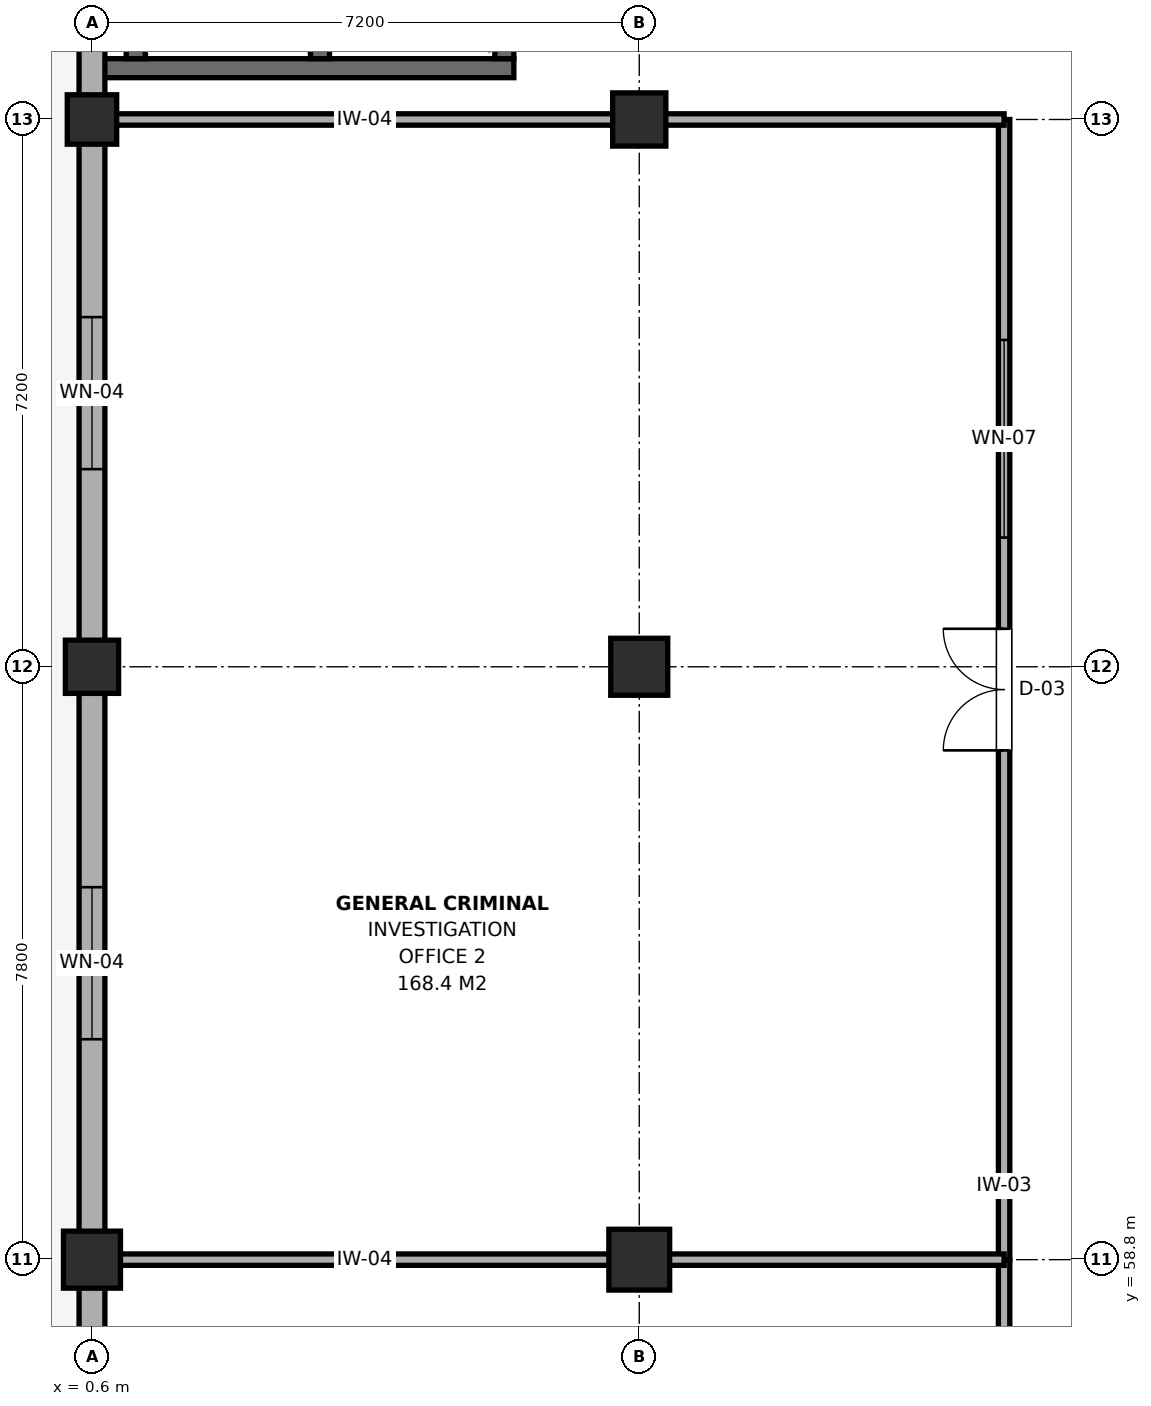
"""IFC4 building model, lengths in metres.
Left out: names, types, materials, properties, quantities, classifications, styles, units other than length and angle.
Written with IfcOpenShell. Run it as: python <this file> out.ifc"""

import sys

from ifc_helpers import new_model, si_unit, direction, frame, frame_2d, origin, origin_2d, place, context, subcontext, project, spatial, rectangle, extrude, element, fill, save


model = new_model("IFC4")
c1 = context("Model", 3, precision=1e-05, world=origin(), true_north=direction((0.0, 1.0)))
c2 = subcontext(c1, "Body", "Model", "MODEL_VIEW")
j1 = project(units=[si_unit("LENGTHUNIT", "METRE"), si_unit("PLANEANGLEUNIT", "RADIAN")], contexts=[c1])
p1 = place(None, origin())
s1 = spatial("IfcSite", under=j1, at=p1, CompositionType="ELEMENT")
p2 = place(p1, origin())
s2 = spatial("IfcBuilding", under=s1, at=p2, CompositionType="ELEMENT")
p3 = place(p2, frame((0.0, 0.0, 4.8)))
s3 = spatial("IfcBuildingStorey", under=s2, at=p3, CompositionType="ELEMENT", Elevation=4.8)
p4 = place(p3, frame((0.6, 58.8, 0.0), z_axis=(0.0, 0.0, 1.0), x_axis=(1.0, 0.0, 0.0)))
e1 = element("IfcColumn", 1, at=p4, inside=s3, PredefinedType="COLUMN", context=c2, shape_type="SweptSolid", body=[
    extrude(rectangle(XDim=0.75, YDim=0.75, at=origin_2d()), origin(), (0.0, 0.0, 1.0), 4.2),
])
p5 = place(p3, frame((0.6, 66.6, 0.0), z_axis=(0.0, 0.0, 1.0), x_axis=(1.0, 0.0, 0.0)))
e2 = element("IfcColumn", 2, at=p5, inside=s3, PredefinedType="COLUMN", context=c2, shape_type="SweptSolid", body=[
    extrude(rectangle(XDim=0.7, YDim=0.7, at=origin_2d()), origin(), (0.0, 0.0, 1.0), 4.2),
])
p6 = place(p3, frame((0.6, 73.8, 0.0), z_axis=(0.0, 0.0, 1.0), x_axis=(1.0, 0.0, 0.0)))
e3 = element("IfcColumn", 3, at=p6, inside=s3, PredefinedType="COLUMN", context=c2, shape_type="SweptSolid", body=[
    extrude(rectangle(XDim=0.65, YDim=0.65, at=origin_2d()), origin(), (0.0, 0.0, 1.0), 4.2),
])
p7 = place(p3, frame((7.8, 58.8, 0.0), z_axis=(0.0, 0.0, 1.0), x_axis=(1.0, 0.0, 0.0)))
e4 = element("IfcColumn", 4, at=p7, inside=s3, PredefinedType="COLUMN", context=c2, shape_type="SweptSolid", body=[
    extrude(rectangle(XDim=0.8, YDim=0.8, at=origin_2d()), origin(), (0.0, 0.0, 1.0), 4.2),
])
p8 = place(p3, frame((7.8, 66.6, 0.0), z_axis=(0.0, 0.0, 1.0), x_axis=(1.0, 0.0, 0.0)))
e5 = element("IfcColumn", 5, at=p8, inside=s3, PredefinedType="COLUMN", context=c2, shape_type="SweptSolid", body=[
    extrude(rectangle(XDim=0.75, YDim=0.75, at=origin_2d()), origin(), (0.0, 0.0, 1.0), 4.2),
])
p9 = place(p3, frame((7.8, 73.8, 0.0), z_axis=(0.0, 0.0, 1.0), x_axis=(1.0, 0.0, 0.0)))
e6 = element("IfcColumn", 6, at=p9, inside=s3, PredefinedType="COLUMN", context=c2, shape_type="SweptSolid", body=[
    extrude(rectangle(XDim=0.7, YDim=0.7, at=origin_2d()), origin(), (0.0, 0.0, 1.0), 4.2),
])
p10 = place(p3, frame((0.75, 74.475, 0.0), z_axis=(0.0, 0.0, 1.0), x_axis=(1.0, 0.0, 0.0)))
e7 = element("IfcWall", 7, at=p10, inside=s3, PredefinedType="SHEAR", context=c2, shape_type="SweptSolid", body=[
    extrude(rectangle(XDim=5.4, YDim=0.25, at=frame_2d((2.7, 0.0))), origin(), (0.0, 0.0, 1.0), 3.98),
])
for number, where, z_axis, x_axis in (
    (8, (1.175, 74.6, 0.0), (0.0, 0.0, 1.0), (0.0, 1.0, 0.0)),
    (9, (3.6, 74.6, 0.0), (0.0, 0.0, 1.0), (0.0, 1.0, 0.0)),
):
    element("IfcWall", number, at=place(p3, frame(where, z_axis=z_axis, x_axis=x_axis)), inside=s3, PredefinedType="SHEAR", context=c2, shape_type="SweptSolid", body=[
        extrude(rectangle(XDim=3.0, YDim=0.25, at=frame_2d((1.5, 0.0))), origin(), (0.0, 0.0, 1.0), 3.98),
    ])
p11 = place(p3, frame((6.025, 74.6, 0.0), z_axis=(0.0, 0.0, 1.0), x_axis=(0.0, 1.0, 0.0)))
e10 = element("IfcWall", 10, at=p11, inside=s3, PredefinedType="SHEAR", context=c2, shape_type="SweptSolid", body=[
    extrude(rectangle(XDim=2.4, YDim=0.25, at=frame_2d((1.2, 0.0))), origin(), (0.0, 0.0, 1.0), 3.98),
])
p12 = place(p11, frame((0.7, 0.0, 0.0)))
e11 = element("IfcOpeningElement", 11, at=p12, cuts=e10, PredefinedType="OPENING", context=c2, shape_type="SweptSolid", body=[
    extrude(rectangle(XDim=1.0, YDim=2.15, at=frame_2d((0.5, 1.075))), frame((0.0, 0.14, 0.0), z_axis=(0.0, -1.0, 0.0), x_axis=(1.0, 0.0, 0.0)), (0.0, 0.0, 1.0), 0.28),
])
p13 = place(p3, frame((0.6, 53.2, 0.0), z_axis=(0.0, 0.0, 1.0), x_axis=(0.0, 1.0, 0.0)))
e12 = element("IfcWall", 12, at=p13, inside=s3, PredefinedType="SOLIDWALL", context=c2, shape_type="SweptSolid", body=[
    extrude(rectangle(XDim=5.6, YDim=0.34, at=frame_2d((2.8, 0.0))), origin(), (0.0, 0.0, 1.0), 3.375),
])
p14 = place(p13, frame((1.8, 0.0, 0.9)))
e13 = element("IfcOpeningElement", 13, at=p14, cuts=e12, PredefinedType="OPENING", context=c2, shape_type="SweptSolid", body=[
    extrude(rectangle(XDim=2.0, YDim=1.8, at=frame_2d((1.0, 0.9))), frame((0.0, 0.185, 0.0), z_axis=(0.0, -1.0, 0.0), x_axis=(1.0, 0.0, 0.0)), (0.0, 0.0, 1.0), 0.37),
])
p15 = place(p3, frame((0.6, 58.8, 0.0), z_axis=(0.0, 0.0, 1.0), x_axis=(0.0, 1.0, 0.0)))
e14 = element("IfcWall", 14, at=p15, inside=s3, PredefinedType="SOLIDWALL", context=c2, shape_type="SweptSolid", body=[
    extrude(rectangle(XDim=7.8, YDim=0.34, at=frame_2d((3.9, 0.0))), origin(), (0.0, 0.0, 1.0), 3.425),
])
p16 = place(p15, frame((2.9, 0.0, 0.9)))
e15 = element("IfcOpeningElement", 15, at=p16, cuts=e14, PredefinedType="OPENING", context=c2, shape_type="SweptSolid", body=[
    extrude(rectangle(XDim=2.0, YDim=1.8, at=frame_2d((1.0, 0.9))), frame((0.0, 0.185, 0.0), z_axis=(0.0, -1.0, 0.0), x_axis=(1.0, 0.0, 0.0)), (0.0, 0.0, 1.0), 0.37),
])
p17 = place(p3, frame((0.6, 66.6, 0.0), z_axis=(0.0, 0.0, 1.0), x_axis=(0.0, 1.0, 0.0)))
e16 = element("IfcWall", 16, at=p17, inside=s3, PredefinedType="SOLIDWALL", context=c2, shape_type="SweptSolid", body=[
    extrude(rectangle(XDim=7.2, YDim=0.34, at=frame_2d((3.6, 0.0))), origin(), (0.0, 0.0, 1.0), 3.475),
])
p18 = place(p17, frame((2.6, 0.0, 0.9)))
e17 = element("IfcOpeningElement", 17, at=p18, cuts=e16, PredefinedType="OPENING", context=c2, shape_type="SweptSolid", body=[
    extrude(rectangle(XDim=2.0, YDim=1.8, at=frame_2d((1.0, 0.9))), frame((0.0, 0.185, 0.0), z_axis=(0.0, -1.0, 0.0), x_axis=(1.0, 0.0, 0.0)), (0.0, 0.0, 1.0), 0.37),
])
p19 = place(p3, frame((0.6, 73.8, 0.0), z_axis=(0.0, 0.0, 1.0), x_axis=(0.0, 1.0, 0.0)))
e18 = element("IfcWall", 18, at=p19, inside=s3, PredefinedType="SOLIDWALL", context=c2, shape_type="SweptSolid", body=[
    extrude(rectangle(XDim=7.2, YDim=0.34, at=frame_2d((3.6, 0.0))), origin(), (0.0, 0.0, 1.0), 3.525),
])
p20 = place(p3, frame((12.6, 40.0, 0.0), z_axis=(0.0, 0.0, 1.0), x_axis=(0.0, 1.0, 0.0)))
e19 = element("IfcWall", 19, at=p20, inside=s3, PredefinedType="PARTITIONING", context=c2, shape_type="SweptSolid", body=[
    extrude(rectangle(XDim=18.8, YDim=0.15, at=frame_2d((9.4, 0.0))), origin(), (0.0, 0.0, 1.0), 3.425),
])
p21 = place(p20, frame((8.6, 0.0, 0.0)))
e20 = element("IfcOpeningElement", 20, at=p21, cuts=e19, PredefinedType="OPENING", context=c2, shape_type="SweptSolid", body=[
    extrude(rectangle(XDim=1.6, YDim=2.15, at=frame_2d((0.8, 1.075))), frame((0.0, 0.09, 0.0), z_axis=(0.0, -1.0, 0.0), x_axis=(1.0, 0.0, 0.0)), (0.0, 0.0, 1.0), 0.18),
])
p22 = place(p20, frame((3.4, 0.0, 0.95)))
e21 = element("IfcOpeningElement", 21, at=p22, cuts=e19, PredefinedType="OPENING", context=c2, shape_type="SweptSolid", body=[
    extrude(rectangle(XDim=2.6, YDim=1.5, at=frame_2d((1.3, 0.75))), frame((0.0, 0.09, 0.0), z_axis=(0.0, -1.0, 0.0), x_axis=(1.0, 0.0, 0.0)), (0.0, 0.0, 1.0), 0.18),
])
p23 = place(p20, frame((12.8, 0.0, 0.95)))
e22 = element("IfcOpeningElement", 22, at=p23, cuts=e19, PredefinedType="OPENING", context=c2, shape_type="SweptSolid", body=[
    extrude(rectangle(XDim=2.6, YDim=1.5, at=frame_2d((1.3, 0.75))), frame((0.0, 0.09, 0.0), z_axis=(0.0, -1.0, 0.0), x_axis=(1.0, 0.0, 0.0)), (0.0, 0.0, 1.0), 0.18),
])
p24 = place(p3, frame((12.6, 58.8, 0.0), z_axis=(0.0, 0.0, 1.0), x_axis=(0.0, 1.0, 0.0)))
e23 = element("IfcWall", 23, at=p24, inside=s3, PredefinedType="PARTITIONING", context=c2, shape_type="SweptSolid", body=[
    extrude(rectangle(XDim=15.0, YDim=0.15, at=frame_2d((7.5, 0.0))), origin(), (0.0, 0.0, 1.0), 3.375),
])
p25 = place(p24, frame((6.7, 0.0, 0.0)))
e24 = element("IfcOpeningElement", 24, at=p25, cuts=e23, PredefinedType="OPENING", context=c2, shape_type="SweptSolid", body=[
    extrude(rectangle(XDim=1.6, YDim=2.15, at=frame_2d((0.8, 1.075))), frame((0.0, 0.09, 0.0), z_axis=(0.0, -1.0, 0.0), x_axis=(1.0, 0.0, 0.0)), (0.0, 0.0, 1.0), 0.18),
])
p26 = place(p24, frame((9.5, 0.0, 0.95)))
e25 = element("IfcOpeningElement", 25, at=p26, cuts=e23, PredefinedType="OPENING", context=c2, shape_type="SweptSolid", body=[
    extrude(rectangle(XDim=2.6, YDim=1.5, at=frame_2d((1.3, 0.75))), frame((0.0, 0.09, 0.0), z_axis=(0.0, -1.0, 0.0), x_axis=(1.0, 0.0, 0.0)), (0.0, 0.0, 1.0), 0.18),
])
for number, where, z_axis, x_axis in (
    (26, (0.78, 58.8, 0.0), (0.0, 0.0, 1.0), (1.0, 0.0, 0.0)),
    (27, (0.78, 73.8, 0.0), (0.0, 0.0, 1.0), (1.0, 0.0, 0.0)),
):
    element("IfcWall", number, at=place(p3, frame(where, z_axis=z_axis, x_axis=x_axis)), inside=s3, PredefinedType="PARTITIONING", context=c2, shape_type="SweptSolid", body=[
        extrude(rectangle(XDim=11.82, YDim=0.15, at=frame_2d((5.91, 0.0))), origin(), (0.0, 0.0, 1.0), 3.375),
    ])
p27 = place(p16, origin())
e28 = element("IfcWindow", 28, at=p27, inside=s3, PartitioningType="SINGLE_PANEL", PredefinedType="WINDOW", context=c2, shape_type="SweptSolid", body=[
    extrude(rectangle(XDim=2.0, YDim=1.8, at=frame_2d((1.0, 0.9))), frame((0.0, 0.03, 0.0), z_axis=(0.0, -1.0, 0.0), x_axis=(1.0, 0.0, 0.0)), (0.0, 0.0, 1.0), 0.06),
])
fill(e15, e28)
p28 = place(p18, origin())
e29 = element("IfcWindow", 29, at=p28, inside=s3, PartitioningType="SINGLE_PANEL", PredefinedType="WINDOW", context=c2, shape_type="SweptSolid", body=[
    extrude(rectangle(XDim=2.0, YDim=1.8, at=frame_2d((1.0, 0.9))), frame((0.0, 0.03, 0.0), z_axis=(0.0, -1.0, 0.0), x_axis=(1.0, 0.0, 0.0)), (0.0, 0.0, 1.0), 0.06),
])
fill(e17, e29)
p29 = place(p25, origin())
e30 = element("IfcDoor", 30, at=p29, inside=s3, OperationType="DOUBLE_DOOR_SINGLE_SWING", PredefinedType="DOOR", context=c2, shape_type="SweptSolid", body=[
    extrude(rectangle(XDim=1.6, YDim=2.15, at=frame_2d((0.8, 1.075))), frame((0.0, 0.025, 0.0), z_axis=(0.0, -1.0, 0.0), x_axis=(1.0, 0.0, 0.0)), (0.0, 0.0, 1.0), 0.05),
])
fill(e24, e30)
p30 = place(p26, origin())
e31 = element("IfcWindow", 31, at=p30, inside=s3, PartitioningType="SINGLE_PANEL", PredefinedType="WINDOW", context=c2, shape_type="SweptSolid", body=[
    extrude(rectangle(XDim=2.6, YDim=1.5, at=frame_2d((1.3, 0.75))), frame((0.0, 0.03, 0.0), z_axis=(0.0, -1.0, 0.0), x_axis=(1.0, 0.0, 0.0)), (0.0, 0.0, 1.0), 0.06),
])
fill(e25, e31)
save(model, sys.argv[1])
